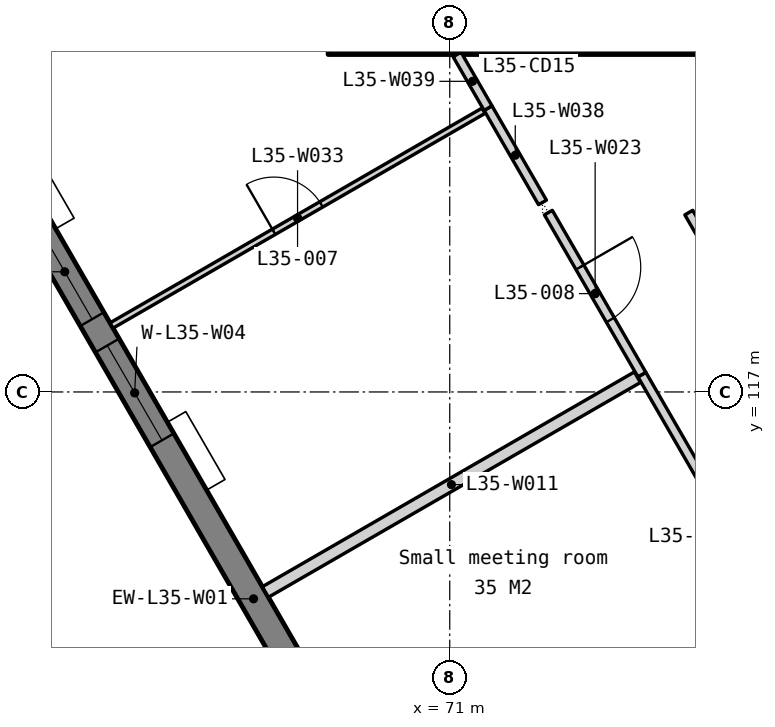
"""IFC4 building model, lengths in metres.
Left out: names, types, materials, properties, quantities, classifications, styles, units other than length and angle.
Written with IfcOpenShell. Run it as: python <this file> out.ifc"""

import sys

from ifc_helpers import new_model, si_unit, direction, frame, frame_2d, origin, place, context, subcontext, project, spatial, polyline, rectangle, outline, extrude, element, fill, save


model = new_model("IFC4")
c1 = context("Model", 3, precision=1e-05, world=origin(), true_north=direction((0.0, 1.0)))
c2 = subcontext(c1, "Body", "Model", "MODEL_VIEW")
j1 = project(units=[si_unit("LENGTHUNIT", "METRE"), si_unit("PLANEANGLEUNIT", "RADIAN")], contexts=[c1])
p1 = place(None, origin())
s1 = spatial("IfcSite", under=j1, at=p1, CompositionType="ELEMENT")
p2 = place(p1, origin())
s2 = spatial("IfcBuilding", under=s1, at=p2, CompositionType="ELEMENT")
p3 = place(p2, frame((0.0, 0.0, 140.3)))
s3 = spatial("IfcBuildingStorey", under=s2, at=p3, CompositionType="ELEMENT", Elevation=140.3)
p4 = place(p3, frame((69.0, 122.85, 0.0), z_axis=(0.0, 0.0, 1.0), x_axis=(1.0, 0.0, 0.0)))
e1 = element("IfcWall", 1, at=p4, inside=s3, PredefinedType="SOLIDWALL", context=c2, shape_type="SweptSolid", body=[
    extrude(rectangle(XDim=22.0, YDim=0.6, at=frame_2d((11.0, 0.0))), origin(), (0.0, 0.0, 1.0), 3.75),
])
p5 = place(p4, frame((16.375, 0.0, 0.0)))
e2 = element("IfcOpeningElement", 2, at=p5, cuts=e1, PredefinedType="OPENING", context=c2, shape_type="SweptSolid", body=[
    extrude(rectangle(XDim=1.8, YDim=2.1, at=frame_2d((0.9, 1.05))), frame((0.0, 0.31, 0.0), z_axis=(0.0, -1.0, 0.0), x_axis=(1.0, 0.0, 0.0)), (0.0, 0.0, 1.0), 0.62),
])
p6 = place(p4, frame((3.825, 0.0, 0.0)))
e3 = element("IfcOpeningElement", 3, at=p6, cuts=e1, PredefinedType="OPENING", context=c2, shape_type="SweptSolid", body=[
    extrude(rectangle(XDim=1.8, YDim=2.1, at=frame_2d((0.9, 1.05))), frame((0.0, 0.31, 0.0), z_axis=(0.0, -1.0, 0.0), x_axis=(1.0, 0.0, 0.0)), (0.0, 0.0, 1.0), 0.62),
])
p7 = place(p4, frame((12.85, 0.0, 0.0)))
e4 = element("IfcOpeningElement", 4, at=p7, cuts=e1, PredefinedType="OPENING", context=c2, shape_type="SweptSolid", body=[
    extrude(rectangle(XDim=1.5, YDim=2.1, at=frame_2d((0.75, 1.05))), frame((0.0, 0.31, 0.0), z_axis=(0.0, -1.0, 0.0), x_axis=(1.0, 0.0, 0.0)), (0.0, 0.0, 1.0), 0.62),
])
p8 = place(p3, frame((57.652, 131.129, -0.15), z_axis=(0.0, 0.0, 1.0), x_axis=(0.499997369791, -0.866026922331, 0.0)))
e5 = element("IfcWall", 5, at=p8, inside=s3, PredefinedType="SOLIDWALL", context=c2, shape_type="SweptSolid", body=[
    extrude(outline(polyline([(40.486, 0.0), (40.486, 3.9), (0.0, 3.9), (0.0, 0.0), (40.486, 0.0)])), frame((0.0, 0.225, 0.0), z_axis=(0.0, -1.0, 0.0), x_axis=(1.0, 0.0, 0.0)), (0.0, 0.0, 1.0), 0.45),
])
p9 = place(p8, frame((3.011, 0.0, 0.95)))
e6 = element("IfcOpeningElement", 6, at=p9, cuts=e5, PredefinedType="OPENING", context=c2, shape_type="SweptSolid", body=[
    extrude(rectangle(XDim=1.8, YDim=2.2, at=frame_2d((0.9, 1.1))), frame((0.0, 0.235, 0.0), z_axis=(0.0, -1.0, 0.0), x_axis=(1.0, 0.0, 0.0)), (0.0, 0.0, 1.0), 0.47),
])
p10 = place(p8, frame((5.311, 0.0, 0.95)))
e7 = element("IfcOpeningElement", 7, at=p10, cuts=e5, PredefinedType="OPENING", context=c2, shape_type="SweptSolid", body=[
    extrude(rectangle(XDim=1.8, YDim=2.2, at=frame_2d((0.9, 1.1))), frame((0.0, 0.235, 0.0), z_axis=(0.0, -1.0, 0.0), x_axis=(1.0, 0.0, 0.0)), (0.0, 0.0, 1.0), 0.47),
])
p11 = place(p8, frame((13.132, 0.0, 0.95)))
e8 = element("IfcOpeningElement", 8, at=p11, cuts=e5, PredefinedType="OPENING", context=c2, shape_type="SweptSolid", body=[
    extrude(rectangle(XDim=1.8, YDim=2.2, at=frame_2d((0.9, 1.1))), frame((0.0, 0.235, 0.0), z_axis=(0.0, -1.0, 0.0), x_axis=(1.0, 0.0, 0.0)), (0.0, 0.0, 1.0), 0.47),
])
p12 = place(p8, frame((15.432, 0.0, 0.95)))
e9 = element("IfcOpeningElement", 9, at=p12, cuts=e5, PredefinedType="OPENING", context=c2, shape_type="SweptSolid", body=[
    extrude(rectangle(XDim=1.8, YDim=2.2, at=frame_2d((0.9, 1.1))), frame((0.0, 0.235, 0.0), z_axis=(0.0, -1.0, 0.0), x_axis=(1.0, 0.0, 0.0)), (0.0, 0.0, 1.0), 0.47),
])
p13 = place(p8, frame((23.254, 0.0, 0.95)))
e10 = element("IfcOpeningElement", 10, at=p13, cuts=e5, PredefinedType="OPENING", context=c2, shape_type="SweptSolid", body=[
    extrude(rectangle(XDim=1.8, YDim=2.2, at=frame_2d((0.9, 1.1))), frame((0.0, 0.235, 0.0), z_axis=(0.0, -1.0, 0.0), x_axis=(1.0, 0.0, 0.0)), (0.0, 0.0, 1.0), 0.47),
])
p14 = place(p8, frame((25.554, 0.0, 0.95)))
e11 = element("IfcOpeningElement", 11, at=p14, cuts=e5, PredefinedType="OPENING", context=c2, shape_type="SweptSolid", body=[
    extrude(rectangle(XDim=1.8, YDim=2.2, at=frame_2d((0.9, 1.1))), frame((0.0, 0.235, 0.0), z_axis=(0.0, -1.0, 0.0), x_axis=(1.0, 0.0, 0.0)), (0.0, 0.0, 1.0), 0.47),
])
p15 = place(p8, frame((33.375, 0.0, 0.95)))
e12 = element("IfcOpeningElement", 12, at=p15, cuts=e5, PredefinedType="OPENING", context=c2, shape_type="SweptSolid", body=[
    extrude(rectangle(XDim=1.8, YDim=2.2, at=frame_2d((0.9, 1.1))), frame((0.0, 0.235, 0.0), z_axis=(0.0, -1.0, 0.0), x_axis=(1.0, 0.0, 0.0)), (0.0, 0.0, 1.0), 0.47),
])
p16 = place(p8, frame((35.675, 0.0, 0.95)))
e13 = element("IfcOpeningElement", 13, at=p16, cuts=e5, PredefinedType="OPENING", context=c2, shape_type="SweptSolid", body=[
    extrude(rectangle(XDim=1.8, YDim=2.2, at=frame_2d((0.9, 1.1))), frame((0.0, 0.235, 0.0), z_axis=(0.0, -1.0, 0.0), x_axis=(1.0, 0.0, 0.0)), (0.0, 0.0, 1.0), 0.47),
])
p17 = place(p3, frame((70.499, 109.327, 0.0), z_axis=(0.0, 0.0, 1.0), x_axis=(0.866010067511, 0.500026562264, 0.0)))
e14 = element("IfcWall", 14, at=p17, inside=s3, PredefinedType="PARTITIONING", context=c2, shape_type="SweptSolid", body=[
    extrude(rectangle(XDim=7.065, YDim=0.2, at=frame_2d((3.532, 0.0))), origin(), (0.0, 0.0, 1.0), 3.75),
])
p18 = place(p3, frame((74.931, 119.95, 0.0), z_axis=(0.0, 0.0, 1.0), x_axis=(0.499998319705, -0.866026373901, 0.0)))
e15 = element("IfcWall", 15, at=p18, inside=s3, PredefinedType="PARTITIONING", context=c2, shape_type="SweptSolid", body=[
    extrude(rectangle(XDim=10.138, YDim=0.15, at=frame_2d((5.069, 0.0))), origin(), (0.0, 0.0, 1.0), 3.75),
])
p19 = place(p18, frame((4.169, 0.0, 0.0)))
e16 = element("IfcOpeningElement", 16, at=p19, cuts=e15, PredefinedType="OPENING", context=c2, shape_type="SweptSolid", body=[
    extrude(rectangle(XDim=1.8, YDim=2.1, at=frame_2d((0.9, 1.05))), frame((0.0, 0.085, 0.0), z_axis=(0.0, -1.0, 0.0), x_axis=(1.0, 0.0, 0.0)), (0.0, 0.0, 1.0), 0.17),
])
p20 = place(p3, frame((74.16, 117.285, 0.0), z_axis=(0.0, 0.0, 1.0), x_axis=(0.500035650373, -0.866004820053, 0.0)))
e17 = element("IfcWall", 17, at=p20, inside=s3, PredefinedType="PARTITIONING", context=c2, shape_type="SweptSolid", body=[
    extrude(rectangle(XDim=5.061, YDim=0.15, at=frame_2d((2.53, 0.0))), origin(), (0.0, 0.0, 1.0), 3.75),
])
p21 = place(p20, frame((2.03, 0.0, 0.0)))
e18 = element("IfcOpeningElement", 18, at=p21, cuts=e17, PredefinedType="OPENING", context=c2, shape_type="SweptSolid", body=[
    extrude(rectangle(XDim=1.0, YDim=2.1, at=frame_2d((0.5, 1.05))), frame((0.0, 0.085, 0.0), z_axis=(0.0, -1.0, 0.0), x_axis=(1.0, 0.0, 0.0)), (0.0, 0.0, 1.0), 0.17),
])
p22 = place(p3, frame((67.968, 113.71, 0.0), z_axis=(0.0, 0.0, 1.0), x_axis=(0.866025031136, 0.500000645445, 0.0)))
e19 = element("IfcWall", 19, at=p22, inside=s3, PredefinedType="PARTITIONING", context=c2, shape_type="SweptSolid", body=[
    extrude(rectangle(XDim=7.065, YDim=0.2, at=frame_2d((3.532, 0.0))), origin(), (0.0, 0.0, 1.0), 3.75),
])
p23 = place(p3, frame((72.622, 119.95, 0.0), z_axis=(0.0, 0.0, 1.0), x_axis=(0.4999536902, -0.866052139109, 0.0)))
e20 = element("IfcWall", 20, at=p23, inside=s3, PredefinedType="PARTITIONING", context=c2, shape_type="SweptSolid", body=[
    extrude(rectangle(XDim=3.077, YDim=0.15, at=frame_2d((1.539, 0.0))), origin(), (0.0, 0.0, 1.0), 3.75),
])
p24 = place(p23, frame((1.039, 0.0, 0.0)))
e21 = element("IfcOpeningElement", 21, at=p24, cuts=e20, PredefinedType="OPENING", context=c2, shape_type="SweptSolid", body=[
    extrude(rectangle(XDim=1.0, YDim=2.1, at=frame_2d((0.5, 1.05))), frame((0.0, 0.085, 0.0), z_axis=(0.0, -1.0, 0.0), x_axis=(1.0, 0.0, 0.0)), (0.0, 0.0, 1.0), 0.17),
])
p25 = place(p3, frame((65.438, 118.093, 0.0), z_axis=(0.0, 0.0, 1.0), x_axis=(0.866025031136, 0.500000645445, 0.0)))
e22 = element("IfcWall", 22, at=p25, inside=s3, PredefinedType="PARTITIONING", context=c2, shape_type="SweptSolid", body=[
    extrude(rectangle(XDim=7.065, YDim=0.1, at=frame_2d((3.532, 0.0))), origin(), (0.0, 0.0, 1.0), 3.75),
])
p26 = place(p25, frame((3.083, 0.0, 0.0)))
e23 = element("IfcOpeningElement", 23, at=p26, cuts=e22, PredefinedType="OPENING", context=c2, shape_type="SweptSolid", body=[
    extrude(rectangle(XDim=0.9, YDim=2.1, at=frame_2d((0.45, 1.05))), frame((0.0, 0.06, 0.0), z_axis=(0.0, -1.0, 0.0), x_axis=(1.0, 0.0, 0.0)), (0.0, 0.0, 1.0), 0.12),
])
p27 = place(p3, frame((71.63, 121.668, 0.0), z_axis=(0.0, 0.0, 1.0), x_axis=(0.499982180423, -0.866035691677, 0.0)))
e24 = element("IfcWall", 24, at=p27, inside=s3, PredefinedType="PARTITIONING", context=c2, shape_type="SweptSolid", body=[
    extrude(rectangle(XDim=1.79, YDim=0.15, at=frame_2d((0.895, 0.0))), origin(), (0.0, 0.0, 1.0), 3.75),
])
p28 = place(p3, frame((71.121, 122.55, 0.0), z_axis=(0.0, 0.0, 1.0), x_axis=(0.500006018292, -0.866021929094, 0.0)))
e25 = element("IfcWall", 25, at=p28, inside=s3, PredefinedType="PARTITIONING", context=c2, shape_type="SweptSolid", body=[
    extrude(rectangle(XDim=1.019, YDim=0.15, at=frame_2d((0.509, 0.0))), origin(), (0.0, 0.0, 1.0), 3.75),
])
p29 = place(p11, origin())
e26 = element("IfcWindow", 26, at=p29, inside=s3, PartitioningType="SINGLE_PANEL", PredefinedType="WINDOW", context=c2, shape_type="SweptSolid", body=[
    extrude(rectangle(XDim=1.8, YDim=2.2, at=frame_2d((0.9, 1.1))), frame((0.0, 0.03, 0.0), z_axis=(0.0, -1.0, 0.0), x_axis=(1.0, 0.0, 0.0)), (0.0, 0.0, 1.0), 0.06),
])
fill(e8, e26)
p30 = place(p12, origin())
e27 = element("IfcWindow", 27, at=p30, inside=s3, PartitioningType="SINGLE_PANEL", PredefinedType="WINDOW", context=c2, shape_type="SweptSolid", body=[
    extrude(rectangle(XDim=1.8, YDim=2.2, at=frame_2d((0.9, 1.1))), frame((0.0, 0.03, 0.0), z_axis=(0.0, -1.0, 0.0), x_axis=(1.0, 0.0, 0.0)), (0.0, 0.0, 1.0), 0.06),
])
fill(e9, e27)
p31 = place(p26, origin())
e28 = element("IfcDoor", 28, at=p31, inside=s3, OperationType="SINGLE_SWING_LEFT", PredefinedType="DOOR", context=c2, shape_type="SweptSolid", body=[
    extrude(rectangle(XDim=0.9, YDim=2.1, at=frame_2d((0.45, 1.05))), frame((0.0, 0.025, 0.0), z_axis=(0.0, -1.0, 0.0), x_axis=(1.0, 0.0, 0.0)), (0.0, 0.0, 1.0), 0.05),
])
fill(e23, e28)
p32 = place(p24, origin())
e29 = element("IfcDoor", 29, at=p32, inside=s3, OperationType="SINGLE_SWING_LEFT", PredefinedType="DOOR", context=c2, shape_type="SweptSolid", body=[
    extrude(rectangle(XDim=1.0, YDim=2.1, at=frame_2d((0.5, 1.05))), frame((0.0, 0.025, 0.0), z_axis=(0.0, -1.0, 0.0), x_axis=(1.0, 0.0, 0.0)), (0.0, 0.0, 1.0), 0.05),
])
fill(e21, e29)
save(model, sys.argv[1])
